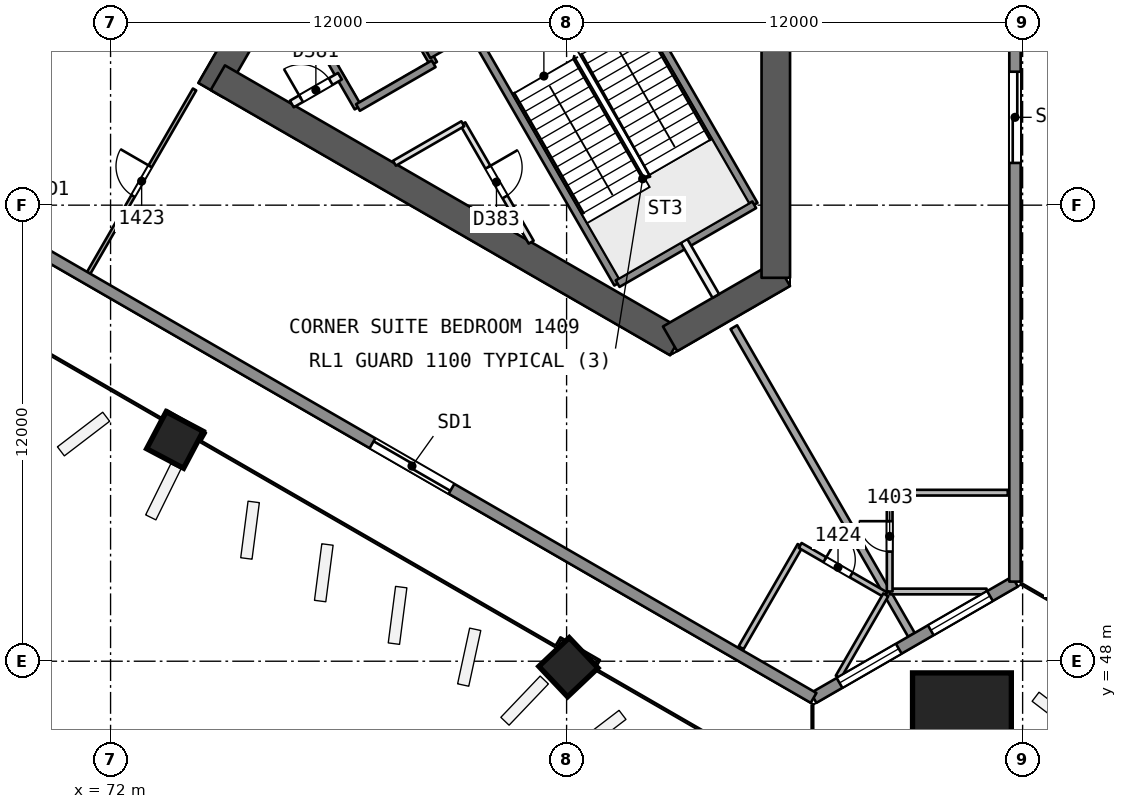
"""IFC4 building model, lengths in metres.
Left out: names, types, materials, properties, quantities, classifications, styles, units other than length and angle.
Written with IfcOpenShell. Run it as: python <this file> out.ifc"""

import sys

from ifc_helpers import new_model, si_unit, direction, frame, frame_2d, origin, origin_2d, place, context, subcontext, project, spatial, rectangle, extrude, element, fill, save


model = new_model("IFC4")
c1 = context("Model", 3, precision=1e-05, world=origin(), true_north=direction((0.0, 1.0)))
c2 = subcontext(c1, "Body", "Model", "MODEL_VIEW")
j1 = project(units=[si_unit("LENGTHUNIT", "METRE"), si_unit("PLANEANGLEUNIT", "RADIAN")], contexts=[c1])
p1 = place(None, origin())
s1 = spatial("IfcSite", under=j1, at=p1, CompositionType="ELEMENT")
p2 = place(p1, origin())
s2 = spatial("IfcBuilding", under=s1, at=p2, CompositionType="ELEMENT")
p3 = place(p2, frame((0.0, 0.0, 64.7)))
s3 = spatial("IfcBuildingStorey", under=s2, at=p3, CompositionType="ELEMENT", Elevation=64.7)
p4 = place(p3, frame((79.717, 71.831, 0.0), z_axis=(0.0, 0.0, 1.0), x_axis=(-0.499996230114, -0.866027580318, 0.0)))
e1 = element("IfcWall", 1, at=p4, inside=s3, PredefinedType="SHEAR", context=c2, shape_type="SweptSolid", body=[
    extrude(rectangle(XDim=10.164, YDim=0.75, at=frame_2d((5.082, 0.0))), origin(), (0.0, 0.0, 1.0), 3.7),
])
p5 = place(p4, frame((0.733, 0.0, 0.0)))
e2 = element("IfcOpeningElement", 2, at=p5, cuts=e1, PredefinedType="OPENING", context=c2, shape_type="SweptSolid", body=[
    extrude(rectangle(XDim=1.2, YDim=2.1, at=frame_2d((0.6, 1.05))), frame((0.0, 0.385, 0.0), z_axis=(0.0, -1.0, 0.0), x_axis=(1.0, 0.0, 0.0)), (0.0, 0.0, 1.0), 0.771),
])
p6 = place(p3, frame((74.822, 63.354, 0.0), z_axis=(0.0, 0.0, 1.0), x_axis=(0.8660248072, -0.500001033313, 0.0)))
e3 = element("IfcWall", 3, at=p6, inside=s3, PredefinedType="SHEAR", context=c2, shape_type="SweptSolid", body=[
    extrude(rectangle(XDim=13.958, YDim=0.75, at=frame_2d((6.979, 0.0))), origin(), (0.0, 0.0, 1.0), 3.7),
])
p7 = place(p3, frame((86.723, 56.483, 0.0), z_axis=(0.0, 0.0, 1.0), x_axis=(0.866017201164, 0.500014207086, 0.0)))
e4 = element("IfcWall", 4, at=p7, inside=s3, PredefinedType="SHEAR", context=c2, shape_type="SweptSolid", body=[
    extrude(rectangle(XDim=3.429, YDim=0.75, at=frame_2d((1.714, 0.0))), origin(), (0.0, 0.0, 1.0), 3.7),
])
p8 = place(p3, frame((89.505, 58.089, 0.0), z_axis=(0.0, 0.0, 1.0), x_axis=(0.0, 1.0, 0.0)))
e5 = element("IfcWall", 5, at=p8, inside=s3, PredefinedType="SHEAR", context=c2, shape_type="SweptSolid", body=[
    extrude(rectangle(XDim=14.117, YDim=0.75, at=frame_2d((7.059, 0.0))), origin(), (0.0, 0.0, 1.0), 3.7),
])
p9 = place(p3, frame((73.692, 53.794, 0.0), z_axis=(0.000857578916, 0.022824792675, 0.999739112668), x_axis=(-0.499949597911, -0.865818985073, 0.020196153983)))
e6 = element("IfcColumn", 6, at=p9, inside=s3, PredefinedType="COLUMN", context=c2, shape_type="SweptSolid", body=[
    extrude(rectangle(XDim=1.1, YDim=1.1, at=origin_2d()), origin(), (0.0, 0.0, 1.0), 3.701),
])
p10 = place(p3, frame((84.058, 47.809, 0.0), z_axis=(-0.00837646992, 0.028097450282, 0.999570091609), x_axis=(-0.499674157986, -0.865978933611, 0.020154959265)))
e7 = element("IfcColumn", 7, at=p10, inside=s3, PredefinedType="COLUMN", context=c2, shape_type="SweptSolid", body=[
    extrude(rectangle(XDim=1.1, YDim=1.1, at=origin_2d()), origin(), (0.0, 0.0, 1.0), 3.702),
])
p11 = place(p3, frame((94.424, 46.356, 0.0), z_axis=(-0.017607037296, 0.030466109479, 0.999380712447), x_axis=(-0.865810468985, -0.500372093343, 3.3778e-08)))
e8 = element("IfcColumn", 8, at=p11, inside=s3, PredefinedType="COLUMN", context=c2, shape_type="SweptSolid", body=[
    extrude(rectangle(XDim=2.6, YDim=2.6, at=origin_2d()), origin(), (0.0, 0.0, 1.0), 3.702),
])
p12 = place(p3, frame((95.051, 49.835, 0.0), z_axis=(0.0, 0.0, 1.0), x_axis=(-1.0, 0.0, 0.0)))
e9 = element("IfcWall", 9, at=p12, inside=s3, PredefinedType="PARTITIONING", context=c2, shape_type="SweptSolid", body=[
    extrude(rectangle(XDim=2.55, YDim=0.15, at=frame_2d((1.275, 0.0))), origin(), (0.0, 0.0, 1.0), 3.2),
])
p13 = place(p3, frame((92.501, 49.835, 0.0), z_axis=(0.0, 0.0, 1.0), x_axis=(0.0, 1.0, 0.0)))
e10 = element("IfcWall", 10, at=p13, inside=s3, PredefinedType="PARTITIONING", context=c2, shape_type="SweptSolid", body=[
    extrude(rectangle(XDim=2.6, YDim=0.15, at=frame_2d((1.3, 0.0))), origin(), (0.0, 0.0, 1.0), 3.2),
])
p14 = place(p13, frame((1.05, 0.0, 0.0)))
e11 = element("IfcOpeningElement", 11, at=p14, cuts=e10, PredefinedType="OPENING", context=c2, shape_type="SweptSolid", body=[
    extrude(rectangle(XDim=0.8, YDim=2.1, at=frame_2d((0.4, 1.05))), frame((0.0, 0.085, 0.0), z_axis=(0.0, -1.0, 0.0), x_axis=(1.0, 0.0, 0.0)), (0.0, 0.0, 1.0), 0.171),
])
p15 = place(p3, frame((92.501, 52.435, 0.0), z_axis=(0.0, 0.0, 1.0), x_axis=(1.0, 0.0, 0.0)))
e12 = element("IfcWall", 12, at=p15, inside=s3, PredefinedType="PARTITIONING", context=c2, shape_type="SweptSolid", body=[
    extrude(rectangle(XDim=3.108, YDim=0.15, at=frame_2d((1.554, 0.0))), origin(), (0.0, 0.0, 1.0), 3.2),
])
p16 = place(p3, frame((88.401, 56.789, 0.0), z_axis=(0.0, 0.0, 1.0), x_axis=(0.49998471623, -0.866034227694, 0.0)))
e13 = element("IfcWall", 13, at=p16, inside=s3, PredefinedType="PARTITIONING", context=c2, shape_type="SweptSolid", body=[
    extrude(rectangle(XDim=9.347, YDim=0.2, at=frame_2d((4.674, 0.0))), origin(), (0.0, 0.0, 1.0), 3.2),
])
p17 = place(p3, frame((67.375, 60.557, 0.0), z_axis=(0.0, 0.0, 1.0), x_axis=(0.499993305868, 0.866029268609, 0.0)))
e14 = element("IfcWall", 14, at=p17, inside=s3, PredefinedType="PARTITIONING", context=c2, shape_type="SweptSolid", body=[
    extrude(rectangle(XDim=13.551, YDim=0.2, at=frame_2d((6.775, 0.0))), origin(), (0.0, 0.0, 1.0), 3.2),
])
p18 = place(p3, frame((71.425, 58.219, 0.0), z_axis=(0.0, 0.0, 1.0), x_axis=(0.499975327912, 0.866039647752, 0.0)))
e15 = element("IfcWall", 15, at=p18, inside=s3, PredefinedType="PARTITIONING", context=c2, shape_type="SweptSolid", body=[
    extrude(rectangle(XDim=5.572, YDim=0.1, at=frame_2d((2.786, 0.0))), origin(), (0.0, 0.0, 1.0), 3.2),
])
p19 = place(p18, frame((2.336, 0.0, 0.0)))
e16 = element("IfcOpeningElement", 16, at=p19, cuts=e15, PredefinedType="OPENING", context=c2, shape_type="SweptSolid", body=[
    extrude(rectangle(XDim=0.9, YDim=2.1, at=frame_2d((0.45, 1.05))), frame((0.0, 0.061, 0.0), z_axis=(0.0, -1.0, 0.0), x_axis=(1.0, 0.0, 0.0)), (0.0, 0.0, 1.0), 0.121),
])
p20 = place(p3, frame((88.593, 48.354, 0.0), z_axis=(0.0, 0.0, 1.0), x_axis=(0.499983108224, 0.866035156036, 0.0)))
e17 = element("IfcWall", 17, at=p20, inside=s3, PredefinedType="PARTITIONING", context=c2, shape_type="SweptSolid", body=[
    extrude(rectangle(XDim=3.108, YDim=0.15, at=frame_2d((1.554, 0.0))), origin(), (0.0, 0.0, 1.0), 3.2),
])
p21 = place(p3, frame((90.146, 51.046, 0.0), z_axis=(0.0, 0.0, 1.0), x_axis=(0.866021400173, -0.500006934395, 0.0)))
e18 = element("IfcWall", 18, at=p21, inside=s3, PredefinedType="PARTITIONING", context=c2, shape_type="SweptSolid", body=[
    extrude(rectangle(XDim=2.6, YDim=0.15, at=frame_2d((1.3, 0.0))), origin(), (0.0, 0.0, 1.0), 3.2),
])
p22 = place(p21, frame((0.75, 0.0, 0.0)))
e19 = element("IfcOpeningElement", 19, at=p22, cuts=e18, PredefinedType="OPENING", context=c2, shape_type="SweptSolid", body=[
    extrude(rectangle(XDim=0.8, YDim=2.1, at=frame_2d((0.4, 1.05))), frame((0.0, 0.085, 0.0), z_axis=(0.0, -1.0, 0.0), x_axis=(1.0, 0.0, 0.0)), (0.0, 0.0, 1.0), 0.171),
])
p23 = place(p3, frame((92.398, 49.746, 0.0), z_axis=(0.0, 0.0, 1.0), x_axis=(-0.500015568388, -0.866016415185, 0.0)))
e20 = element("IfcWall", 20, at=p23, inside=s3, PredefinedType="PARTITIONING", context=c2, shape_type="SweptSolid", body=[
    extrude(rectangle(XDim=2.5, YDim=0.15, at=frame_2d((1.25, 0.0))), origin(), (0.0, 0.0, 1.0), 3.2),
])
p24 = place(p3, frame((95.8, 50.095, 0.0), z_axis=(0.0, 0.0, 1.0), x_axis=(-0.866022842194, -0.500004436779, 0.0)))
e21 = element("IfcWall", 21, at=p24, inside=s3, PredefinedType="SOLIDWALL", context=c2, shape_type="SweptSolid", body=[
    extrude(rectangle(XDim=6.121, YDim=0.3, at=frame_2d((3.06, 0.0))), origin(), (0.0, 0.0, 1.0), 3.2),
])
p25 = place(p24, frame((0.76, 0.0, 0.9)))
e22 = element("IfcOpeningElement", 22, at=p25, cuts=e21, PredefinedType="OPENING", context=c2, shape_type="SweptSolid", body=[
    extrude(rectangle(XDim=1.8, YDim=1.5, at=frame_2d((0.9, 0.75))), frame((0.0, 0.161, 0.0), z_axis=(0.0, -1.0, 0.0), x_axis=(1.0, 0.0, 0.0)), (0.0, 0.0, 1.0), 0.321),
])
p26 = place(p24, frame((3.532, 0.0, 0.9)))
e23 = element("IfcOpeningElement", 23, at=p26, cuts=e21, PredefinedType="OPENING", context=c2, shape_type="SweptSolid", body=[
    extrude(rectangle(XDim=1.8, YDim=1.5, at=frame_2d((0.9, 0.75))), frame((0.0, 0.161, 0.0), z_axis=(0.0, -1.0, 0.0), x_axis=(1.0, 0.0, 0.0)), (0.0, 0.0, 1.0), 0.321),
])
p27 = place(p3, frame((95.8, 109.905, 0.0), z_axis=(0.0, 0.0, 1.0), x_axis=(0.0, -1.0, 0.0)))
e24 = element("IfcWall", 24, at=p27, inside=s3, PredefinedType="SOLIDWALL", context=c2, shape_type="SweptSolid", body=[
    extrude(rectangle(XDim=59.811, YDim=0.3, at=frame_2d((29.905, 0.0))), origin(), (0.0, 0.0, 1.0), 3.2),
])
p28 = place(p27, frame((28.394, 0.0, 0.0)))
e25 = element("IfcOpeningElement", 25, at=p28, cuts=e24, PredefinedType="OPENING", context=c2, shape_type="SweptSolid", body=[
    extrude(rectangle(XDim=2.4, YDim=2.4, at=frame_2d((1.2, 1.2))), frame((0.0, 0.161, 0.0), z_axis=(0.0, -1.0, 0.0), x_axis=(1.0, 0.0, 0.0)), (0.0, 0.0, 1.0), 0.321),
])
p29 = place(p27, frame((34.161, 0.0, 0.0)))
e26 = element("IfcOpeningElement", 26, at=p29, cuts=e24, PredefinedType="OPENING", context=c2, shape_type="SweptSolid", body=[
    extrude(rectangle(XDim=2.4, YDim=2.4, at=frame_2d((1.2, 1.2))), frame((0.0, 0.161, 0.0), z_axis=(0.0, -1.0, 0.0), x_axis=(1.0, 0.0, 0.0)), (0.0, 0.0, 1.0), 0.321),
])
p30 = place(p27, frame((46.394, 0.0, 0.0)))
e27 = element("IfcOpeningElement", 27, at=p30, cuts=e24, PredefinedType="OPENING", context=c2, shape_type="SweptSolid", body=[
    extrude(rectangle(XDim=2.4, YDim=2.4, at=frame_2d((1.2, 1.2))), frame((0.0, 0.161, 0.0), z_axis=(0.0, -1.0, 0.0), x_axis=(1.0, 0.0, 0.0)), (0.0, 0.0, 1.0), 0.321),
])
p31 = place(p27, frame((22.938, 0.0, 0.0)))
e28 = element("IfcOpeningElement", 28, at=p31, cuts=e24, PredefinedType="OPENING", context=c2, shape_type="SweptSolid", body=[
    extrude(rectangle(XDim=2.4, YDim=2.4, at=frame_2d((1.2, 1.2))), frame((0.0, 0.161, 0.0), z_axis=(0.0, -1.0, 0.0), x_axis=(1.0, 0.0, 0.0)), (0.0, 0.0, 1.0), 0.321),
])
p32 = place(p27, frame((11.002, 0.0, 0.0)))
e29 = element("IfcOpeningElement", 29, at=p32, cuts=e24, PredefinedType="OPENING", context=c2, shape_type="SweptSolid", body=[
    extrude(rectangle(XDim=2.4, YDim=2.4, at=frame_2d((1.2, 1.2))), frame((0.0, 0.161, 0.0), z_axis=(0.0, -1.0, 0.0), x_axis=(1.0, 0.0, 0.0)), (0.0, 0.0, 1.0), 0.321),
])
p33 = place(p3, frame((90.499, 47.034, 0.0), z_axis=(0.0, 0.0, 1.0), x_axis=(-0.866026049211, 0.499998882086, 0.0)))
e30 = element("IfcWall", 30, at=p33, inside=s3, PredefinedType="SOLIDWALL", context=c2, shape_type="SweptSolid", body=[
    extrude(rectangle(XDim=59.811, YDim=0.3, at=frame_2d((29.905, 0.0))), origin(), (0.0, 0.0, 1.0), 3.2),
])
p34 = place(p33, frame((28.705, 0.0, 0.0)))
e31 = element("IfcOpeningElement", 31, at=p34, cuts=e30, PredefinedType="OPENING", context=c2, shape_type="SweptSolid", body=[
    extrude(rectangle(XDim=2.4, YDim=2.4, at=frame_2d((1.2, 1.2))), frame((0.0, 0.161, 0.0), z_axis=(0.0, -1.0, 0.0), x_axis=(1.0, 0.0, 0.0)), (0.0, 0.0, 1.0), 0.321),
])
p35 = place(p33, frame((34.161, 0.0, 0.0)))
e32 = element("IfcOpeningElement", 32, at=p35, cuts=e30, PredefinedType="OPENING", context=c2, shape_type="SweptSolid", body=[
    extrude(rectangle(XDim=2.4, YDim=2.4, at=frame_2d((1.2, 1.2))), frame((0.0, 0.161, 0.0), z_axis=(0.0, -1.0, 0.0), x_axis=(1.0, 0.0, 0.0)), (0.0, 0.0, 1.0), 0.321),
])
p36 = place(p33, frame((46.394, 0.0, 0.0)))
e33 = element("IfcOpeningElement", 33, at=p36, cuts=e30, PredefinedType="OPENING", context=c2, shape_type="SweptSolid", body=[
    extrude(rectangle(XDim=2.4, YDim=2.4, at=frame_2d((1.2, 1.2))), frame((0.0, 0.161, 0.0), z_axis=(0.0, -1.0, 0.0), x_axis=(1.0, 0.0, 0.0)), (0.0, 0.0, 1.0), 0.321),
])
p37 = place(p33, frame((23.249, 0.0, 0.0)))
e34 = element("IfcOpeningElement", 34, at=p37, cuts=e30, PredefinedType="OPENING", context=c2, shape_type="SweptSolid", body=[
    extrude(rectangle(XDim=2.4, YDim=2.4, at=frame_2d((1.2, 1.2))), frame((0.0, 0.161, 0.0), z_axis=(0.0, -1.0, 0.0), x_axis=(1.0, 0.0, 0.0)), (0.0, 0.0, 1.0), 0.321),
])
p38 = place(p33, frame((11.002, 0.0, 0.0)))
e35 = element("IfcOpeningElement", 35, at=p38, cuts=e30, PredefinedType="OPENING", context=c2, shape_type="SweptSolid", body=[
    extrude(rectangle(XDim=2.4, YDim=2.4, at=frame_2d((1.2, 1.2))), frame((0.0, 0.161, 0.0), z_axis=(0.0, -1.0, 0.0), x_axis=(1.0, 0.0, 0.0)), (0.0, 0.0, 1.0), 0.321),
])
p39 = place(p3, frame((77.135, 64.952, 0.0), z_axis=(0.0, 0.0, 1.0), x_axis=(0.499996545922, -0.866027397988, 0.0)))
e36 = element("IfcWall", 36, at=p39, inside=s3, PredefinedType="SOLIDWALL", context=c2, shape_type="SweptSolid", body=[
    extrude(rectangle(XDim=2.75, YDim=0.2, at=frame_2d((1.375, 0.0))), origin(), (0.0, 0.0, 1.0), 3.2),
])
p40 = place(p3, frame((81.269, 62.142, 0.0), z_axis=(0.0, 0.0, 1.0), x_axis=(0.500043557135, -0.866000254601, 0.0)))
e37 = element("IfcWall", 37, at=p40, inside=s3, PredefinedType="PARTITIONING", context=c2, shape_type="SweptSolid", body=[
    extrude(rectangle(XDim=3.598, YDim=0.15, at=frame_2d((1.799, 0.0))), origin(), (0.0, 0.0, 1.0), 3.2),
])
p41 = place(p40, frame((1.322, 0.0, 0.0)))
e38 = element("IfcOpeningElement", 38, at=p41, cuts=e37, PredefinedType="OPENING", context=c2, shape_type="SweptSolid", body=[
    extrude(rectangle(XDim=0.9, YDim=2.1, at=frame_2d((0.45, 1.05))), frame((0.0, 0.085, 0.0), z_axis=(0.0, -1.0, 0.0), x_axis=(1.0, 0.0, 0.0)), (0.0, 0.0, 1.0), 0.171),
])
p42 = place(p3, frame((79.127, 66.102, 0.0), z_axis=(0.0, 0.0, 1.0), x_axis=(0.499996545922, -0.866027397988, 0.0)))
e39 = element("IfcWall", 39, at=p42, inside=s3, PredefinedType="SOLIDWALL", context=c2, shape_type="SweptSolid", body=[
    extrude(rectangle(XDim=2.75, YDim=0.2, at=frame_2d((1.375, 0.0))), origin(), (0.0, 0.0, 1.0), 3.2),
])
p43 = place(p3, frame((81.493, 64.604, 0.0), z_axis=(0.0, 0.0, 1.0), x_axis=(0.500006057782, -0.866021906294, 0.0)))
e40 = element("IfcWall", 40, at=p43, inside=s3, PredefinedType="SOLIDWALL", context=c2, shape_type="SweptSolid", body=[
    extrude(rectangle(XDim=7.7, YDim=0.2, at=frame_2d((3.85, 0.0))), origin(), (0.0, 0.0, 1.0), 3.2),
])
p44 = place(p3, frame((87.09, 59.06, 0.0), z_axis=(0.0, 0.0, 1.0), x_axis=(0.499937194881, -0.866061661301, 0.0)))
e41 = element("IfcWall", 41, at=p44, inside=s3, PredefinedType="PARTITIONING", context=c2, shape_type="SweptSolid", body=[
    extrude(rectangle(XDim=1.673, YDim=0.2, at=frame_2d((0.836, 0.0))), origin(), (0.0, 0.0, 1.0), 3.2),
])
p45 = place(p3, frame((85.087, 66.679, 0.0), z_axis=(0.0, 0.0, 1.0), x_axis=(0.500019787375, -0.866013979237, 0.0)))
e42 = element("IfcWall", 42, at=p45, inside=s3, PredefinedType="SOLIDWALL", context=c2, shape_type="SweptSolid", body=[
    extrude(rectangle(XDim=7.7, YDim=0.2, at=frame_2d((3.85, 0.0))), origin(), (0.0, 0.0, 1.0), 3.2),
])
p46 = place(p45, frame((0.55, 0.0, 0.0)))
e43 = element("IfcOpeningElement", 43, at=p46, cuts=e42, PredefinedType="OPENING", context=c2, shape_type="SweptSolid", body=[
    extrude(rectangle(XDim=1.1, YDim=2.1, at=frame_2d((0.55, 1.05))), frame((0.0, 0.11, 0.0), z_axis=(0.0, -1.0, 0.0), x_axis=(1.0, 0.0, 0.0)), (0.0, 0.0, 1.0), 0.221),
])
p47 = place(p3, frame((76.77, 62.662, 0.0), z_axis=(0.0, 0.0, 1.0), x_axis=(0.866054810376, 0.49994906283, 0.0)))
e44 = element("IfcWall", 44, at=p47, inside=s3, PredefinedType="PARTITIONING", context=c2, shape_type="SweptSolid", body=[
    extrude(rectangle(XDim=1.461, YDim=0.2, at=frame_2d((0.73, 0.0))), origin(), (0.0, 0.0, 1.0), 3.2),
])
p48 = place(p47, frame((0.281, 0.0, 0.0)))
e45 = element("IfcOpeningElement", 45, at=p48, cuts=e44, PredefinedType="OPENING", context=c2, shape_type="SweptSolid", body=[
    extrude(rectangle(XDim=0.9, YDim=2.1, at=frame_2d((0.45, 1.05))), frame((0.0, 0.11, 0.0), z_axis=(0.0, -1.0, 0.0), x_axis=(1.0, 0.0, 0.0)), (0.0, 0.0, 1.0), 0.221),
])
p49 = place(p3, frame((80.367, 63.954, 0.0), z_axis=(0.0, 0.0, 1.0), x_axis=(0.866026575979, 0.499997969693, 0.0)))
e46 = element("IfcWall", 46, at=p49, inside=s3, PredefinedType="SOLIDWALL", context=c2, shape_type="SweptSolid", body=[
    extrude(rectangle(XDim=6.75, YDim=0.2, at=frame_2d((3.375, 0.0))), origin(), (0.0, 0.0, 1.0), 3.2),
])
p50 = place(p3, frame((78.51, 62.57, 0.0), z_axis=(0.0, 0.0, 1.0), x_axis=(0.866053019151, 0.499952165731, 0.0)))
e47 = element("IfcWall", 47, at=p50, inside=s3, PredefinedType="SOLIDWALL", context=c2, shape_type="SweptSolid", body=[
    extrude(rectangle(XDim=2.3, YDim=0.2, at=frame_2d((1.15, 0.0))), origin(), (0.0, 0.0, 1.0), 3.2),
])
p51 = place(p3, frame((79.47, 61.103, 0.0), z_axis=(0.0, 0.0, 1.0), x_axis=(0.866021168401, 0.500007335828, 0.0)))
e48 = element("IfcWall", 48, at=p51, inside=s3, PredefinedType="PARTITIONING", context=c2, shape_type="SweptSolid", body=[
    extrude(rectangle(XDim=2.077, YDim=0.15, at=frame_2d((1.039, 0.0))), origin(), (0.0, 0.0, 1.0), 3.2),
])
p52 = place(p3, frame((85.343, 57.935, 0.0), z_axis=(0.0, 0.0, 1.0), x_axis=(0.866004344652, 0.500036473714, 0.0)))
e49 = element("IfcWall", 49, at=p52, inside=s3, PredefinedType="SOLIDWALL", context=c2, shape_type="SweptSolid", body=[
    extrude(rectangle(XDim=4.15, YDim=0.2, at=frame_2d((2.075, 0.0))), origin(), (0.0, 0.0, 1.0), 3.2),
])
p53 = place(p14, origin())
e50 = element("IfcDoor", 50, at=p53, inside=s3, OperationType="SINGLE_SWING_RIGHT", PredefinedType="NOTDEFINED", context=c2, shape_type="SweptSolid", body=[
    extrude(rectangle(XDim=0.8, YDim=2.1, at=frame_2d((0.4, 1.05))), frame((0.0, 0.025, 0.0), z_axis=(0.0, -1.0, 0.0), x_axis=(1.0, 0.0, 0.0)), (0.0, 0.0, 1.0), 0.05),
])
fill(e11, e50)
p54 = place(p19, origin())
e51 = element("IfcDoor", 51, at=p54, inside=s3, OperationType="SINGLE_SWING_RIGHT", PredefinedType="NOTDEFINED", context=c2, shape_type="SweptSolid", body=[
    extrude(rectangle(XDim=0.9, YDim=2.1, at=frame_2d((0.45, 1.05))), frame((0.0, 0.025, 0.0), z_axis=(0.0, -1.0, 0.0), x_axis=(1.0, 0.0, 0.0)), (0.0, 0.0, 1.0), 0.05),
])
fill(e16, e51)
p55 = place(p22, origin())
e52 = element("IfcDoor", 52, at=p55, inside=s3, OperationType="SINGLE_SWING_LEFT", PredefinedType="NOTDEFINED", context=c2, shape_type="SweptSolid", body=[
    extrude(rectangle(XDim=0.8, YDim=2.1, at=frame_2d((0.4, 1.05))), frame((0.0, 0.025, 0.0), z_axis=(0.0, -1.0, 0.0), x_axis=(1.0, 0.0, 0.0)), (0.0, 0.0, 1.0), 0.05),
])
fill(e19, e52)
p56 = place(p25, origin())
e53 = element("IfcWindow", 53, at=p56, inside=s3, PartitioningType="SINGLE_PANEL", PredefinedType="WINDOW", context=c2, shape_type="SweptSolid", body=[
    extrude(rectangle(XDim=1.8, YDim=1.5, at=frame_2d((0.9, 0.75))), frame((0.0, 0.03, 0.0), z_axis=(0.0, -1.0, 0.0), x_axis=(1.0, 0.0, 0.0)), (0.0, 0.0, 1.0), 0.06),
])
fill(e22, e53)
p57 = place(p26, origin())
e54 = element("IfcWindow", 54, at=p57, inside=s3, PartitioningType="SINGLE_PANEL", PredefinedType="WINDOW", context=c2, shape_type="SweptSolid", body=[
    extrude(rectangle(XDim=1.8, YDim=1.5, at=frame_2d((0.9, 0.75))), frame((0.0, 0.03, 0.0), z_axis=(0.0, -1.0, 0.0), x_axis=(1.0, 0.0, 0.0)), (0.0, 0.0, 1.0), 0.06),
])
fill(e23, e54)
p58 = place(p30, origin())
e55 = element("IfcDoor", 55, at=p58, inside=s3, OperationType="SLIDING_TO_LEFT", PredefinedType="NOTDEFINED", context=c2, shape_type="SweptSolid", body=[
    extrude(rectangle(XDim=2.4, YDim=2.4, at=frame_2d((1.2, 1.2))), frame((0.0, 0.025, 0.0), z_axis=(0.0, -1.0, 0.0), x_axis=(1.0, 0.0, 0.0)), (0.0, 0.0, 1.0), 0.05),
])
fill(e27, e55)
p59 = place(p38, origin())
e56 = element("IfcDoor", 56, at=p59, inside=s3, OperationType="SLIDING_TO_LEFT", PredefinedType="NOTDEFINED", context=c2, shape_type="SweptSolid", body=[
    extrude(rectangle(XDim=2.4, YDim=2.4, at=frame_2d((1.2, 1.2))), frame((0.0, 0.025, 0.0), z_axis=(0.0, -1.0, 0.0), x_axis=(1.0, 0.0, 0.0)), (0.0, 0.0, 1.0), 0.05),
])
fill(e35, e56)
p60 = place(p48, origin())
e57 = element("IfcDoor", 57, at=p60, inside=s3, OperationType="SINGLE_SWING_LEFT", PredefinedType="NOTDEFINED", context=c2, shape_type="SweptSolid", body=[
    extrude(rectangle(XDim=0.9, YDim=2.1, at=frame_2d((0.45, 1.05))), frame((0.0, 0.025, 0.0), z_axis=(0.0, -1.0, 0.0), x_axis=(1.0, 0.0, 0.0)), (0.0, 0.0, 1.0), 0.05),
])
fill(e45, e57)
p61 = place(p41, origin())
e58 = element("IfcDoor", 58, at=p61, inside=s3, OperationType="SINGLE_SWING_LEFT", PredefinedType="NOTDEFINED", context=c2, shape_type="SweptSolid", body=[
    extrude(rectangle(XDim=0.9, YDim=2.1, at=frame_2d((0.45, 1.05))), frame((0.0, 0.025, 0.0), z_axis=(0.0, -1.0, 0.0), x_axis=(1.0, 0.0, 0.0)), (0.0, 0.0, 1.0), 0.05),
])
fill(e38, e58)
save(model, sys.argv[1])
